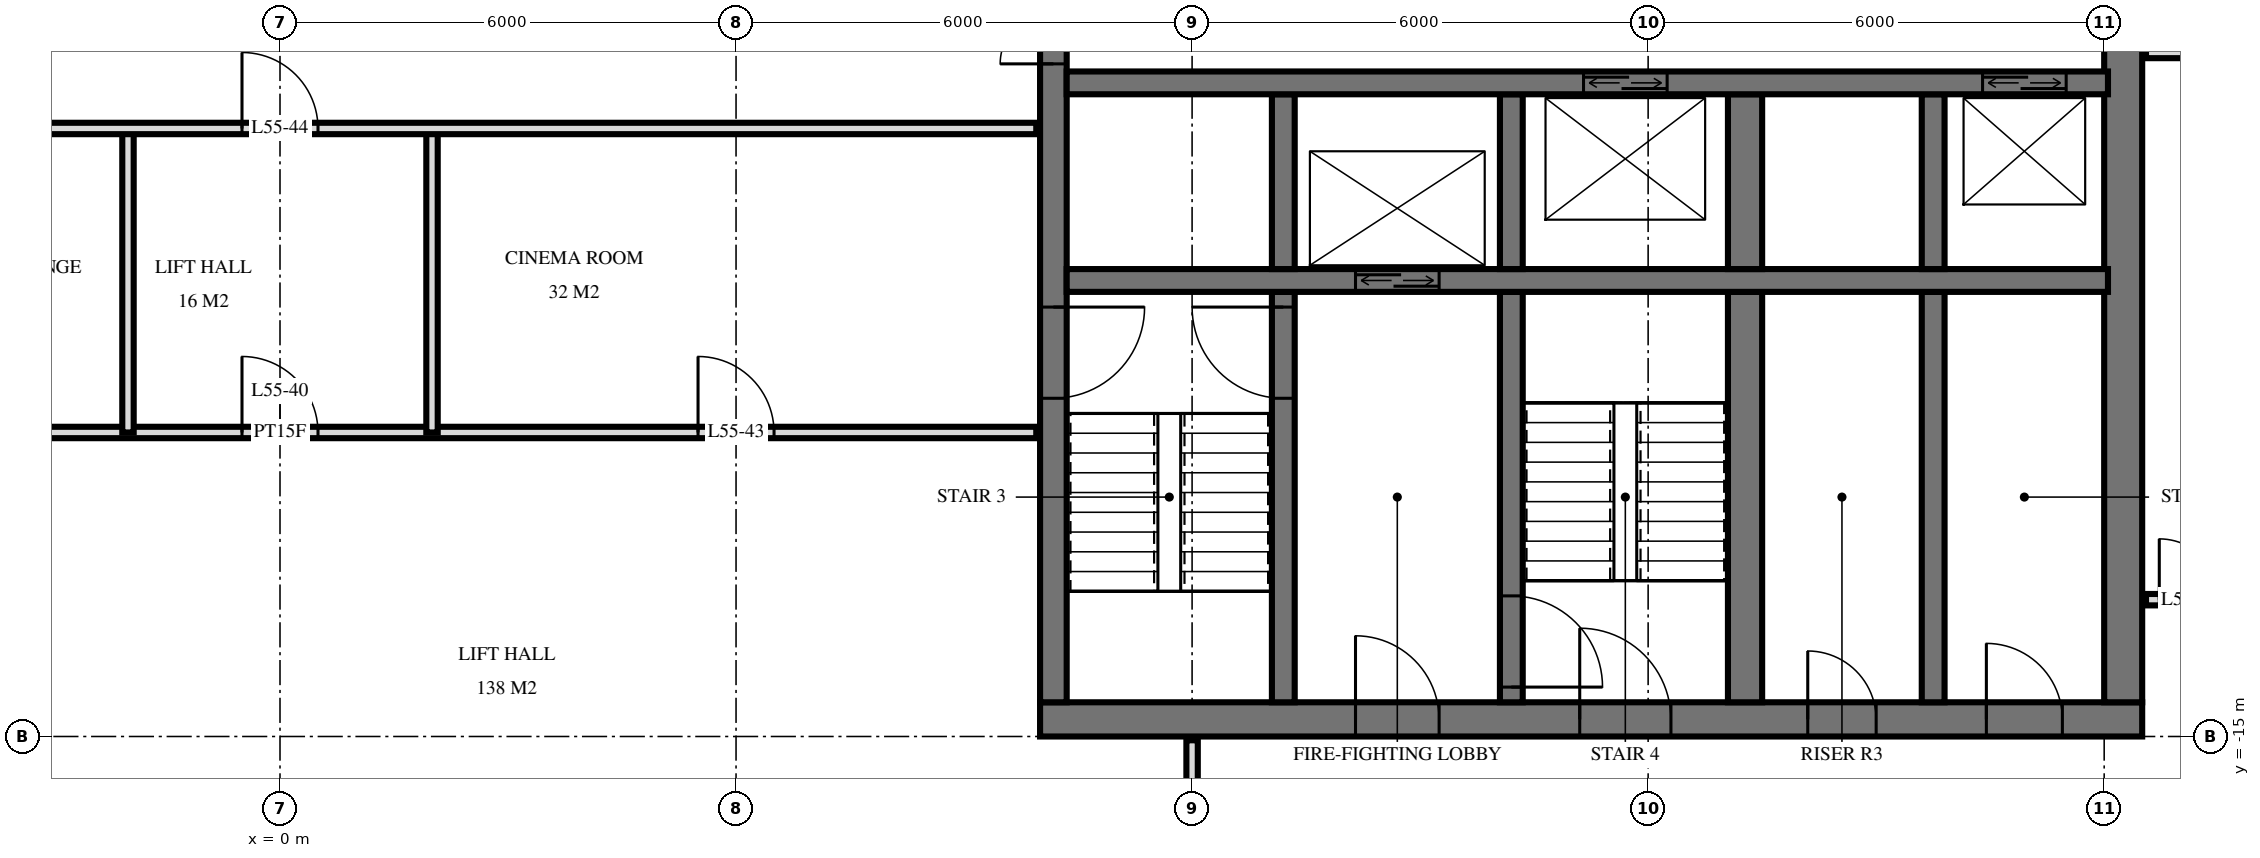
"""IFC4 building model, lengths in metres.
Left out: names, types, materials, properties, quantities, classifications, styles, units other than length and angle.
Written with IfcOpenShell. Run it as: python <this file> out.ifc"""

import sys

from ifc_helpers import new_model, si_unit, direction, frame, frame_2d, origin, place, context, subcontext, project, spatial, rectangle, extrude, element, fill, save


model = new_model("IFC4")
c1 = context("Model", 3, precision=1e-05, world=origin(), true_north=direction((0.0, 1.0)))
c2 = subcontext(c1, "Body", "Model", "MODEL_VIEW")
j1 = project(units=[si_unit("LENGTHUNIT", "METRE"), si_unit("PLANEANGLEUNIT", "RADIAN")], contexts=[c1])
p1 = place(None, origin())
s1 = spatial("IfcSite", under=j1, at=p1, CompositionType="ELEMENT")
p2 = place(p1, origin())
s2 = spatial("IfcBuilding", under=s1, at=p2, CompositionType="ELEMENT")
p3 = place(p2, frame((0.0, 0.0, 211.6)))
s3 = spatial("IfcBuildingStorey", under=s2, at=p3, CompositionType="ELEMENT", Elevation=211.6)
p4 = place(p3, frame((10.0, -14.775, 0.0), z_axis=(0.0, 0.0, 1.0), x_axis=(1.0, 0.0, 0.0)))
e1 = element("IfcWall", 1, at=p4, inside=s3, PredefinedType="SHEAR", context=c2, shape_type="SweptSolid", body=[
    extrude(rectangle(XDim=14.5, YDim=0.45, at=frame_2d((7.25, 0.0))), origin(), (0.0, 0.0, 1.0), 3.5),
])
p5 = place(p4, frame((7.1, 0.0, 0.0)))
e2 = element("IfcOpeningElement", 2, at=p5, cuts=e1, PredefinedType="OPENING", context=c2, shape_type="SweptSolid", body=[
    extrude(rectangle(XDim=1.2, YDim=2.1, at=frame_2d((0.6, 1.05))), frame((0.0, 0.235, 0.0), z_axis=(0.0, -1.0, 0.0), x_axis=(1.0, 0.0, 0.0)), (0.0, 0.0, 1.0), 0.47),
])
p6 = place(p4, frame((4.15, 0.0, 0.0)))
e3 = element("IfcOpeningElement", 3, at=p6, cuts=e1, PredefinedType="OPENING", context=c2, shape_type="SweptSolid", body=[
    extrude(rectangle(XDim=1.1, YDim=2.1, at=frame_2d((0.55, 1.05))), frame((0.0, 0.235, 0.0), z_axis=(0.0, -1.0, 0.0), x_axis=(1.0, 0.0, 0.0)), (0.0, 0.0, 1.0), 0.47),
])
p7 = place(p4, frame((10.1, 0.0, 0.0)))
e4 = element("IfcOpeningElement", 4, at=p7, cuts=e1, PredefinedType="OPENING", context=c2, shape_type="SweptSolid", body=[
    extrude(rectangle(XDim=0.9, YDim=2.1, at=frame_2d((0.45, 1.05))), frame((0.0, 0.235, 0.0), z_axis=(0.0, -1.0, 0.0), x_axis=(1.0, 0.0, 0.0)), (0.0, 0.0, 1.0), 0.47),
])
p8 = place(p4, frame((12.45, 0.0, 0.0)))
e5 = element("IfcOpeningElement", 5, at=p8, cuts=e1, PredefinedType="OPENING", context=c2, shape_type="SweptSolid", body=[
    extrude(rectangle(XDim=1.0, YDim=2.1, at=frame_2d((0.5, 1.05))), frame((0.0, 0.235, 0.0), z_axis=(0.0, -1.0, 0.0), x_axis=(1.0, 0.0, 0.0)), (0.0, 0.0, 1.0), 0.47),
])
p9 = place(p3, frame((10.175, -14.55, 0.0), z_axis=(0.0, 0.0, 1.0), x_axis=(0.0, 1.0, 0.0)))
e6 = element("IfcWall", 6, at=p9, inside=s3, PredefinedType="SHEAR", context=c2, shape_type="SweptSolid", body=[
    extrude(rectangle(XDim=14.1, YDim=0.35, at=frame_2d((7.05, 0.0))), origin(), (0.0, 0.0, 1.0), 3.5),
])
p10 = place(p9, frame((8.4, 0.0, 0.0)))
e7 = element("IfcOpeningElement", 7, at=p10, cuts=e6, PredefinedType="OPENING", context=c2, shape_type="SweptSolid", body=[
    extrude(rectangle(XDim=1.4, YDim=2.4, at=frame_2d((0.7, 1.2))), frame((0.0, 0.185, 0.0), z_axis=(0.0, -1.0, 0.0), x_axis=(1.0, 0.0, 0.0)), (0.0, 0.0, 1.0), 0.37),
])
p11 = place(p9, frame((10.0, 0.0, 0.0)))
e8 = element("IfcOpeningElement", 8, at=p11, cuts=e6, PredefinedType="OPENING", context=c2, shape_type="SweptSolid", body=[
    extrude(rectangle(XDim=1.4, YDim=2.4, at=frame_2d((0.7, 1.2))), frame((0.0, 0.185, 0.0), z_axis=(0.0, -1.0, 0.0), x_axis=(1.0, 0.0, 0.0)), (0.0, 0.0, 1.0), 0.37),
])
p12 = place(p9, frame((4.0, 0.0, 0.0)))
e9 = element("IfcOpeningElement", 9, at=p12, cuts=e6, PredefinedType="OPENING", context=c2, shape_type="SweptSolid", body=[
    extrude(rectangle(XDim=1.2, YDim=2.1, at=frame_2d((0.6, 1.05))), frame((0.0, 0.185, 0.0), z_axis=(0.0, -1.0, 0.0), x_axis=(1.0, 0.0, 0.0)), (0.0, 0.0, 1.0), 0.37),
])
p13 = place(p3, frame((24.25, -14.55, 0.0), z_axis=(0.0, 0.0, 1.0), x_axis=(0.0, 1.0, 0.0)))
e10 = element("IfcWall", 10, at=p13, inside=s3, PredefinedType="SHEAR", context=c2, shape_type="SweptSolid", body=[
    extrude(rectangle(XDim=14.1, YDim=0.5, at=frame_2d((7.05, 0.0))), origin(), (0.0, 0.0, 1.0), 3.5),
])
p14 = place(p3, frame((10.35, -6.4, 0.0), z_axis=(0.0, 0.0, 1.0), x_axis=(1.0, 0.0, 0.0)))
e11 = element("IfcWall", 11, at=p14, inside=s3, PredefinedType="SHEAR", context=c2, shape_type="SweptSolid", body=[
    extrude(rectangle(XDim=13.7, YDim=0.3, at=frame_2d((6.85, 0.0))), origin(), (0.0, 0.0, 1.0), 3.5),
])
p15 = place(p14, frame((12.05, 0.0, 0.0)))
e12 = element("IfcOpeningElement", 12, at=p15, cuts=e11, PredefinedType="OPENING", context=c2, shape_type="SweptSolid", body=[
    extrude(rectangle(XDim=1.1, YDim=2.1, at=frame_2d((0.55, 1.05))), frame((0.0, 0.16, 0.0), z_axis=(0.0, -1.0, 0.0), x_axis=(1.0, 0.0, 0.0)), (0.0, 0.0, 1.0), 0.32),
])
p16 = place(p14, frame((6.8, 0.0, 0.0)))
e13 = element("IfcOpeningElement", 13, at=p16, cuts=e11, PredefinedType="OPENING", context=c2, shape_type="SweptSolid", body=[
    extrude(rectangle(XDim=1.1, YDim=2.1, at=frame_2d((0.55, 1.05))), frame((0.0, 0.16, 0.0), z_axis=(0.0, -1.0, 0.0), x_axis=(1.0, 0.0, 0.0)), (0.0, 0.0, 1.0), 0.32),
])
p17 = place(p3, frame((10.35, -9.0, 0.0), z_axis=(0.0, 0.0, 1.0), x_axis=(1.0, 0.0, 0.0)))
e14 = element("IfcWall", 14, at=p17, inside=s3, PredefinedType="SHEAR", context=c2, shape_type="SweptSolid", body=[
    extrude(rectangle(XDim=13.7, YDim=0.3, at=frame_2d((6.85, 0.0))), origin(), (0.0, 0.0, 1.0), 3.5),
])
p18 = place(p17, frame((3.8, 0.0, 0.0)))
e15 = element("IfcOpeningElement", 15, at=p18, cuts=e14, PredefinedType="OPENING", context=c2, shape_type="SweptSolid", body=[
    extrude(rectangle(XDim=1.1, YDim=2.1, at=frame_2d((0.55, 1.05))), frame((0.0, 0.16, 0.0), z_axis=(0.0, -1.0, 0.0), x_axis=(1.0, 0.0, 0.0)), (0.0, 0.0, 1.0), 0.32),
])
p19 = place(p3, frame((13.2, -8.85, 0.0), z_axis=(0.0, 0.0, 1.0), x_axis=(0.0, 1.0, 0.0)))
e16 = element("IfcWall", 16, at=p19, inside=s3, PredefinedType="SHEAR", context=c2, shape_type="SweptSolid", body=[
    extrude(rectangle(XDim=2.3, YDim=0.3, at=frame_2d((1.15, 0.0))), origin(), (0.0, 0.0, 1.0), 3.5),
])
p20 = place(p3, frame((13.2, -14.55, 0.0), z_axis=(0.0, 0.0, 1.0), x_axis=(0.0, 1.0, 0.0)))
e17 = element("IfcWall", 17, at=p20, inside=s3, PredefinedType="SHEAR", context=c2, shape_type="SweptSolid", body=[
    extrude(rectangle(XDim=5.4, YDim=0.3, at=frame_2d((2.7, 0.0))), origin(), (0.0, 0.0, 1.0), 3.5),
])
p21 = place(p20, frame((4.0, 0.0, 0.0)))
e18 = element("IfcOpeningElement", 18, at=p21, cuts=e17, PredefinedType="OPENING", context=c2, shape_type="SweptSolid", body=[
    extrude(rectangle(XDim=1.2, YDim=2.1, at=frame_2d((0.6, 1.05))), frame((0.0, 0.16, 0.0), z_axis=(0.0, -1.0, 0.0), x_axis=(1.0, 0.0, 0.0)), (0.0, 0.0, 1.0), 0.32),
])
p22 = place(p3, frame((16.2, -8.85, 0.0), z_axis=(0.0, 0.0, 1.0), x_axis=(0.0, 1.0, 0.0)))
e19 = element("IfcWall", 19, at=p22, inside=s3, PredefinedType="SHEAR", context=c2, shape_type="SweptSolid", body=[
    extrude(rectangle(XDim=2.3, YDim=0.3, at=frame_2d((1.15, 0.0))), origin(), (0.0, 0.0, 1.0), 3.5),
])
p23 = place(p3, frame((16.2, -14.55, 0.0), z_axis=(0.0, 0.0, 1.0), x_axis=(0.0, 1.0, 0.0)))
e20 = element("IfcWall", 20, at=p23, inside=s3, PredefinedType="SHEAR", context=c2, shape_type="SweptSolid", body=[
    extrude(rectangle(XDim=5.4, YDim=0.3, at=frame_2d((2.7, 0.0))), origin(), (0.0, 0.0, 1.0), 3.5),
])
p24 = place(p23, frame((0.2, 0.0, 0.0)))
e21 = element("IfcOpeningElement", 21, at=p24, cuts=e20, PredefinedType="OPENING", context=c2, shape_type="SweptSolid", body=[
    extrude(rectangle(XDim=1.2, YDim=2.1, at=frame_2d((0.6, 1.05))), frame((0.0, 0.16, 0.0), z_axis=(0.0, -1.0, 0.0), x_axis=(1.0, 0.0, 0.0)), (0.0, 0.0, 1.0), 0.32),
])
p25 = place(p3, frame((19.275, -8.85, 0.0), z_axis=(0.0, 0.0, 1.0), x_axis=(0.0, 1.0, 0.0)))
e22 = element("IfcWall", 22, at=p25, inside=s3, PredefinedType="SHEAR", context=c2, shape_type="SweptSolid", body=[
    extrude(rectangle(XDim=2.3, YDim=0.45, at=frame_2d((1.15, 0.0))), origin(), (0.0, 0.0, 1.0), 3.5),
])
p26 = place(p3, frame((19.275, -14.55, 0.0), z_axis=(0.0, 0.0, 1.0), x_axis=(0.0, 1.0, 0.0)))
e23 = element("IfcWall", 23, at=p26, inside=s3, PredefinedType="SHEAR", context=c2, shape_type="SweptSolid", body=[
    extrude(rectangle(XDim=5.4, YDim=0.45, at=frame_2d((2.7, 0.0))), origin(), (0.0, 0.0, 1.0), 3.5),
])
p27 = place(p3, frame((21.75, -8.85, 0.0), z_axis=(0.0, 0.0, 1.0), x_axis=(0.0, 1.0, 0.0)))
e24 = element("IfcWall", 24, at=p27, inside=s3, PredefinedType="SHEAR", context=c2, shape_type="SweptSolid", body=[
    extrude(rectangle(XDim=2.3, YDim=0.3, at=frame_2d((1.15, 0.0))), origin(), (0.0, 0.0, 1.0), 3.5),
])
p28 = place(p3, frame((21.75, -14.55, 0.0), z_axis=(0.0, 0.0, 1.0), x_axis=(0.0, 1.0, 0.0)))
e25 = element("IfcWall", 25, at=p28, inside=s3, PredefinedType="SHEAR", context=c2, shape_type="SweptSolid", body=[
    extrude(rectangle(XDim=5.4, YDim=0.3, at=frame_2d((2.7, 0.0))), origin(), (0.0, 0.0, 1.0), 3.5),
])
p29 = place(p3, frame((12.0, -17.4, 0.0), z_axis=(0.0, 0.0, 1.0), x_axis=(0.0, 1.0, 0.0)))
e26 = element("IfcWall", 26, at=p29, inside=s3, PredefinedType="PARTITIONING", context=c2, shape_type="SweptSolid", body=[
    extrude(rectangle(XDim=2.35, YDim=0.15, at=frame_2d((1.175, 0.0))), origin(), (0.0, 0.0, 1.0), 3.22),
])
p30 = place(p29, frame((0.7, 0.0, 0.0)))
e27 = element("IfcOpeningElement", 27, at=p30, cuts=e26, PredefinedType="OPENING", context=c2, shape_type="SweptSolid", body=[
    extrude(rectangle(XDim=1.0, YDim=2.1, at=frame_2d((0.5, 1.05))), frame((0.0, 0.085, 0.0), z_axis=(0.0, -1.0, 0.0), x_axis=(1.0, 0.0, 0.0)), (0.0, 0.0, 1.0), 0.17),
])
for number, where, z_axis, x_axis in (
    (28, (2.0, -11.0, 0.0), (0.0, 0.0, 1.0), (0.0, 1.0, 0.0)),
    (29, (-2.0, -11.0, 0.0), (0.0, 0.0, 1.0), (0.0, 1.0, 0.0)),
):
    element("IfcWall", number, at=place(p3, frame(where, z_axis=z_axis, x_axis=x_axis)), inside=s3, PredefinedType="PARTITIONING", context=c2, shape_type="SweptSolid", body=[
        extrude(rectangle(XDim=4.0, YDim=0.15, at=frame_2d((2.0, 0.0))), origin(), (0.0, 0.0, 1.0), 3.22),
    ])
p31 = place(p3, frame((24.55, -13.2, 0.0), z_axis=(0.0, 0.0, 1.0), x_axis=(1.0, 0.0, 0.0)))
e30 = element("IfcWall", 30, at=p31, inside=s3, PredefinedType="PARTITIONING", context=c2, shape_type="SweptSolid", body=[
    extrude(rectangle(XDim=1.15, YDim=0.15, at=frame_2d((0.575, 0.0))), origin(), (0.0, 0.0, 1.0), 3.22),
])
p32 = place(p31, frame((0.175, 0.0, 0.0)))
e31 = element("IfcOpeningElement", 31, at=p32, cuts=e30, PredefinedType="OPENING", context=c2, shape_type="SweptSolid", body=[
    extrude(rectangle(XDim=0.8, YDim=2.1, at=frame_2d((0.4, 1.05))), frame((0.0, 0.085, 0.0), z_axis=(0.0, -1.0, 0.0), x_axis=(1.0, 0.0, 0.0)), (0.0, 0.0, 1.0), 0.17),
])
p33 = place(p3, frame((-9.95, -11.0, 0.0), z_axis=(0.0, 0.0, 1.0), x_axis=(1.0, 0.0, 0.0)))
e32 = element("IfcWall", 32, at=p33, inside=s3, PredefinedType="PARTITIONING", context=c2, shape_type="SweptSolid", body=[
    extrude(rectangle(XDim=19.9, YDim=0.15, at=frame_2d((9.95, 0.0))), origin(), (0.0, 0.0, 1.0), 3.22),
])
p34 = place(p33, frame((9.45, 0.0, 0.0)))
e33 = element("IfcOpeningElement", 33, at=p34, cuts=e32, PredefinedType="OPENING", context=c2, shape_type="SweptSolid", body=[
    extrude(rectangle(XDim=1.0, YDim=2.1, at=frame_2d((0.5, 1.05))), frame((0.0, 0.085, 0.0), z_axis=(0.0, -1.0, 0.0), x_axis=(1.0, 0.0, 0.0)), (0.0, 0.0, 1.0), 0.17),
])
p35 = place(p33, frame((15.45, 0.0, 0.0)))
e34 = element("IfcOpeningElement", 34, at=p35, cuts=e32, PredefinedType="OPENING", context=c2, shape_type="SweptSolid", body=[
    extrude(rectangle(XDim=1.0, YDim=2.1, at=frame_2d((0.5, 1.05))), frame((0.0, 0.085, 0.0), z_axis=(0.0, -1.0, 0.0), x_axis=(1.0, 0.0, 0.0)), (0.0, 0.0, 1.0), 0.17),
])
p36 = place(p3, frame((-9.95, -7.0, 0.0), z_axis=(0.0, 0.0, 1.0), x_axis=(1.0, 0.0, 0.0)))
e35 = element("IfcWall", 35, at=p36, inside=s3, PredefinedType="PARTITIONING", context=c2, shape_type="SweptSolid", body=[
    extrude(rectangle(XDim=19.9, YDim=0.15, at=frame_2d((9.95, 0.0))), origin(), (0.0, 0.0, 1.0), 3.22),
])
p37 = place(p36, frame((9.45, 0.0, 0.0)))
e36 = element("IfcOpeningElement", 36, at=p37, cuts=e35, PredefinedType="OPENING", context=c2, shape_type="SweptSolid", body=[
    extrude(rectangle(XDim=1.0, YDim=2.1, at=frame_2d((0.5, 1.05))), frame((0.0, 0.085, 0.0), z_axis=(0.0, -1.0, 0.0), x_axis=(1.0, 0.0, 0.0)), (0.0, 0.0, 1.0), 0.17),
])
p38 = place(p36, frame((3.45, 0.0, 0.0)))
e37 = element("IfcOpeningElement", 37, at=p38, cuts=e35, PredefinedType="OPENING", context=c2, shape_type="SweptSolid", body=[
    extrude(rectangle(XDim=1.0, YDim=2.1, at=frame_2d((0.5, 1.05))), frame((0.0, 0.085, 0.0), z_axis=(0.0, -1.0, 0.0), x_axis=(1.0, 0.0, 0.0)), (0.0, 0.0, 1.0), 0.17),
])
p39 = place(p3, frame((24.55, -6.0, 0.0), z_axis=(0.0, 0.0, 1.0), x_axis=(1.0, 0.0, 0.0)))
e38 = element("IfcWall", 38, at=p39, inside=s3, PredefinedType="PARTITIONING", context=c2, shape_type="SweptSolid", body=[
    extrude(rectangle(XDim=2.27, YDim=0.15, at=frame_2d((1.135, 0.0))), origin(), (0.0, 0.0, 1.0), 3.22),
])
p40 = place(p39, frame((0.75, 0.0, 0.0)))
e39 = element("IfcOpeningElement", 39, at=p40, cuts=e38, PredefinedType="OPENING", context=c2, shape_type="SweptSolid", body=[
    extrude(rectangle(XDim=0.9, YDim=2.1, at=frame_2d((0.45, 1.05))), frame((0.0, 0.085, 0.0), z_axis=(0.0, -1.0, 0.0), x_axis=(1.0, 0.0, 0.0)), (0.0, 0.0, 1.0), 0.17),
])
p41 = place(p15, origin())
e40 = element("IfcDoor", 40, at=p41, inside=s3, OperationType="DOUBLE_DOOR_SLIDING", PredefinedType="USERDEFINED", context=c2, shape_type="SweptSolid", body=[
    extrude(rectangle(XDim=1.1, YDim=2.1, at=frame_2d((0.55, 1.05))), frame((0.0, 0.025, 0.0), z_axis=(0.0, -1.0, 0.0), x_axis=(1.0, 0.0, 0.0)), (0.0, 0.0, 1.0), 0.05),
])
fill(e12, e40)
p42 = place(p18, origin())
e41 = element("IfcDoor", 41, at=p42, inside=s3, OperationType="DOUBLE_DOOR_SLIDING", PredefinedType="USERDEFINED", context=c2, shape_type="SweptSolid", body=[
    extrude(rectangle(XDim=1.1, YDim=2.1, at=frame_2d((0.55, 1.05))), frame((0.0, 0.025, 0.0), z_axis=(0.0, -1.0, 0.0), x_axis=(1.0, 0.0, 0.0)), (0.0, 0.0, 1.0), 0.05),
])
fill(e15, e41)
p43 = place(p16, origin())
e42 = element("IfcDoor", 42, at=p43, inside=s3, OperationType="DOUBLE_DOOR_SLIDING", PredefinedType="USERDEFINED", context=c2, shape_type="SweptSolid", body=[
    extrude(rectangle(XDim=1.1, YDim=2.1, at=frame_2d((0.55, 1.05))), frame((0.0, 0.025, 0.0), z_axis=(0.0, -1.0, 0.0), x_axis=(1.0, 0.0, 0.0)), (0.0, 0.0, 1.0), 0.05),
])
fill(e13, e42)
p44 = place(p10, origin())
e43 = element("IfcDoor", 43, at=p44, inside=s3, OperationType="DOUBLE_DOOR_SINGLE_SWING", PredefinedType="DOOR", context=c2, shape_type="SweptSolid", body=[
    extrude(rectangle(XDim=1.4, YDim=2.4, at=frame_2d((0.7, 1.2))), frame((0.0, 0.025, 0.0), z_axis=(0.0, -1.0, 0.0), x_axis=(1.0, 0.0, 0.0)), (0.0, 0.0, 1.0), 0.05),
])
fill(e7, e43)
p45 = place(p12, frame((0.6, 0.0, 0.0), z_axis=(0.0, 0.0, 1.0), x_axis=(-1.0, 0.0, 0.0)))
e44 = element("IfcDoor", 44, at=p45, inside=s3, OperationType="SINGLE_SWING_RIGHT", PredefinedType="DOOR", context=c2, shape_type="SweptSolid", body=[
    extrude(rectangle(XDim=1.2, YDim=2.1, at=frame_2d((0.0, 1.05))), frame((0.0, -0.025, 0.0), z_axis=(0.0, 1.0, 0.0), x_axis=(-1.0, 0.0, 0.0)), (0.0, 0.0, 1.0), 0.05),
])
fill(e9, e44)
p46 = place(p5, origin())
e45 = element("IfcDoor", 45, at=p46, inside=s3, OperationType="SINGLE_SWING_RIGHT", PredefinedType="DOOR", context=c2, shape_type="SweptSolid", body=[
    extrude(rectangle(XDim=1.2, YDim=2.1, at=frame_2d((0.6, 1.05))), frame((0.0, 0.025, 0.0), z_axis=(0.0, -1.0, 0.0), x_axis=(1.0, 0.0, 0.0)), (0.0, 0.0, 1.0), 0.05),
])
fill(e2, e45)
p47 = place(p6, origin())
e46 = element("IfcDoor", 46, at=p47, inside=s3, OperationType="SINGLE_SWING_RIGHT", PredefinedType="DOOR", context=c2, shape_type="SweptSolid", body=[
    extrude(rectangle(XDim=1.1, YDim=2.1, at=frame_2d((0.55, 1.05))), frame((0.0, 0.025, 0.0), z_axis=(0.0, -1.0, 0.0), x_axis=(1.0, 0.0, 0.0)), (0.0, 0.0, 1.0), 0.05),
])
fill(e3, e46)
p48 = place(p7, origin())
e47 = element("IfcDoor", 47, at=p48, inside=s3, OperationType="SINGLE_SWING_RIGHT", PredefinedType="DOOR", context=c2, shape_type="SweptSolid", body=[
    extrude(rectangle(XDim=0.9, YDim=2.1, at=frame_2d((0.45, 1.05))), frame((0.0, 0.025, 0.0), z_axis=(0.0, -1.0, 0.0), x_axis=(1.0, 0.0, 0.0)), (0.0, 0.0, 1.0), 0.05),
])
fill(e4, e47)
p49 = place(p8, origin())
e48 = element("IfcDoor", 48, at=p49, inside=s3, OperationType="SINGLE_SWING_RIGHT", PredefinedType="DOOR", context=c2, shape_type="SweptSolid", body=[
    extrude(rectangle(XDim=1.0, YDim=2.1, at=frame_2d((0.5, 1.05))), frame((0.0, 0.025, 0.0), z_axis=(0.0, -1.0, 0.0), x_axis=(1.0, 0.0, 0.0)), (0.0, 0.0, 1.0), 0.05),
])
fill(e5, e48)
p50 = place(p21, origin())
e49 = element("IfcDoor", 49, at=p50, inside=s3, OperationType="SINGLE_SWING_LEFT", PredefinedType="DOOR", context=c2, shape_type="SweptSolid", body=[
    extrude(rectangle(XDim=1.2, YDim=2.1, at=frame_2d((0.6, 1.05))), frame((0.0, 0.025, 0.0), z_axis=(0.0, -1.0, 0.0), x_axis=(1.0, 0.0, 0.0)), (0.0, 0.0, 1.0), 0.05),
])
fill(e18, e49)
p51 = place(p24, frame((0.6, 0.0, 0.0), z_axis=(0.0, 0.0, 1.0), x_axis=(-1.0, 0.0, 0.0)))
e50 = element("IfcDoor", 50, at=p51, inside=s3, OperationType="SINGLE_SWING_LEFT", PredefinedType="DOOR", context=c2, shape_type="SweptSolid", body=[
    extrude(rectangle(XDim=1.2, YDim=2.1, at=frame_2d((0.0, 1.05))), frame((0.0, -0.025, 0.0), z_axis=(0.0, 1.0, 0.0), x_axis=(-1.0, 0.0, 0.0)), (0.0, 0.0, 1.0), 0.05),
])
fill(e21, e50)
p52 = place(p32, origin())
e51 = element("IfcDoor", 51, at=p52, inside=s3, OperationType="SINGLE_SWING_RIGHT", PredefinedType="DOOR", context=c2, shape_type="SweptSolid", body=[
    extrude(rectangle(XDim=0.8, YDim=2.1, at=frame_2d((0.4, 1.05))), frame((0.0, 0.025, 0.0), z_axis=(0.0, -1.0, 0.0), x_axis=(1.0, 0.0, 0.0)), (0.0, 0.0, 1.0), 0.05),
])
fill(e31, e51)
p53 = place(p34, origin())
e52 = element("IfcDoor", 52, at=p53, inside=s3, OperationType="SINGLE_SWING_RIGHT", PredefinedType="DOOR", context=c2, shape_type="SweptSolid", body=[
    extrude(rectangle(XDim=1.0, YDim=2.1, at=frame_2d((0.5, 1.05))), frame((0.0, 0.025, 0.0), z_axis=(0.0, -1.0, 0.0), x_axis=(1.0, 0.0, 0.0)), (0.0, 0.0, 1.0), 0.05),
])
fill(e33, e52)
p54 = place(p35, origin())
e53 = element("IfcDoor", 53, at=p54, inside=s3, OperationType="SINGLE_SWING_RIGHT", PredefinedType="DOOR", context=c2, shape_type="SweptSolid", body=[
    extrude(rectangle(XDim=1.0, YDim=2.1, at=frame_2d((0.5, 1.05))), frame((0.0, 0.025, 0.0), z_axis=(0.0, -1.0, 0.0), x_axis=(1.0, 0.0, 0.0)), (0.0, 0.0, 1.0), 0.05),
])
fill(e34, e53)
p55 = place(p37, origin())
e54 = element("IfcDoor", 54, at=p55, inside=s3, OperationType="SINGLE_SWING_RIGHT", PredefinedType="DOOR", context=c2, shape_type="SweptSolid", body=[
    extrude(rectangle(XDim=1.0, YDim=2.1, at=frame_2d((0.5, 1.05))), frame((0.0, 0.025, 0.0), z_axis=(0.0, -1.0, 0.0), x_axis=(1.0, 0.0, 0.0)), (0.0, 0.0, 1.0), 0.05),
])
fill(e36, e54)
save(model, sys.argv[1])
